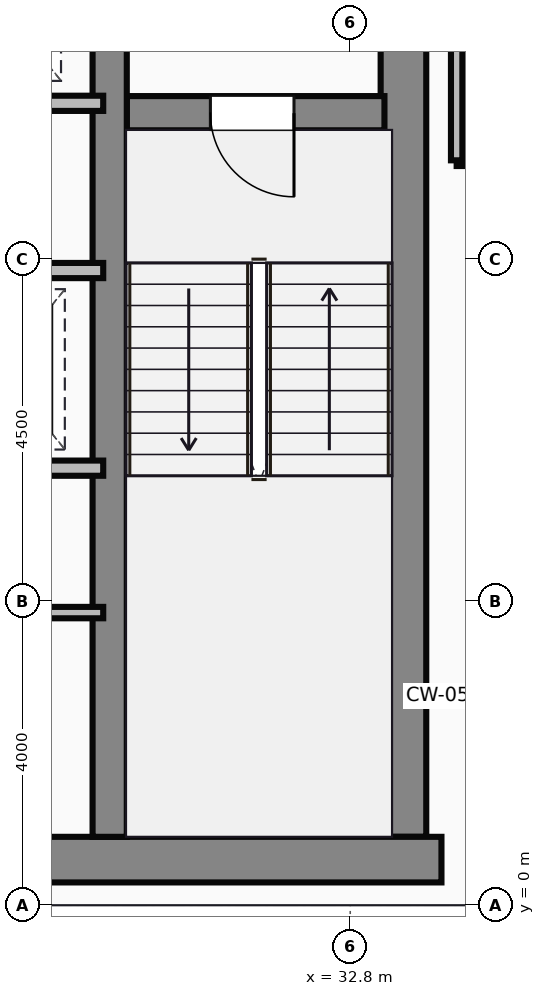
"""IFC4 building model, lengths in metres.
Left out: names, types, materials, properties, quantities, classifications, styles, units other than length and angle.
Written with IfcOpenShell. Run it as: python <this file> out.ifc"""

import sys

from ifc_helpers import new_model, si_unit, direction, frame, frame_2d, origin, place, context, subcontext, project, spatial, rectangle, extrude, source, transform, mapped, element, fill, save


model = new_model("IFC4")
c1 = context("Model", 3, precision=1e-05, world=origin(), true_north=direction((0.0, 1.0)))
c2 = subcontext(c1, "Body", "Model", "MODEL_VIEW")
j1 = project(units=[si_unit("LENGTHUNIT", "METRE"), si_unit("PLANEANGLEUNIT", "RADIAN")], contexts=[c1])
p1 = place(None, origin())
s1 = spatial("IfcSite", under=j1, at=p1, CompositionType="ELEMENT")
p2 = place(p1, origin())
s2 = spatial("IfcBuilding", under=s1, at=p2, CompositionType="ELEMENT")
p3 = place(p2, frame((0.0, 0.0, 188.6)))
s3 = spatial("IfcBuildingStorey", under=s2, at=p3, CompositionType="ELEMENT", Elevation=188.6)
m1 = source(origin(), c2, "Body", "SweptSolid", [
    extrude(rectangle(XDim=29.5, YDim=0.6, at=frame_2d((14.75, 0.0))), origin(), (0.0, 0.0, 1.0), 3.65),
])
p4 = place(p3, frame((4.5, 0.6, 0.0), z_axis=(0.0, 0.0, 1.0), x_axis=(1.0, 0.0, 0.0)))
e1 = element("IfcWall", 1, at=p4, inside=s3, PredefinedType="SHEAR", context=c2, shape_type="MappedRepresentation", body=[
    mapped(m1, transform((0.0, 0.0, 0.0))),
])
m2 = source(origin(), c2, "Body", "SweptSolid", [
    extrude(rectangle(XDim=13.1, YDim=0.6, at=frame_2d((6.55, 0.0))), origin(), (0.0, 0.0, 1.0), 3.65),
])
p5 = place(p3, frame((33.5, 0.9, 0.0), z_axis=(0.0, 0.0, 1.0), x_axis=(0.0, 1.0, 0.0)))
e2 = element("IfcWall", 2, at=p5, inside=s3, PredefinedType="SHEAR", context=c2, shape_type="MappedRepresentation", body=[
    mapped(m2, transform((0.0, 0.0, 0.0))),
])
m3 = source(origin(), c2, "Body", "SweptSolid", [
    extrude(rectangle(XDim=12.5, YDim=0.45, at=frame_2d((6.25, 0.0))), origin(), (0.0, 0.0, 1.0), 3.65),
])
p6 = place(p3, frame((29.635, 0.9, 0.0), z_axis=(0.0, 0.0, 1.0), x_axis=(0.0, 1.0, 0.0)))
e3 = element("IfcWall", 3, at=p6, inside=s3, PredefinedType="SHEAR", context=c2, shape_type="MappedRepresentation", body=[
    mapped(m3, transform((0.0, 0.0, 0.0))),
])
m4 = source(origin(), c2, "Body", "SweptSolid", [
    extrude(rectangle(XDim=3.39, YDim=0.45, at=frame_2d((1.695, 0.0))), origin(), (0.0, 0.0, 1.0), 3.65),
])
p7 = place(p3, frame((29.86, 10.42, 0.0), z_axis=(0.0, 0.0, 1.0), x_axis=(1.0, 0.0, 0.0)))
e4 = element("IfcWall", 4, at=p7, inside=s3, PredefinedType="SHEAR", context=c2, shape_type="MappedRepresentation", body=[
    mapped(m4, transform((0.0, 0.0, 0.0))),
])
p8 = place(p7, frame((1.1, 0.0, 0.0)))
e5 = element("IfcOpeningElement", 5, at=p8, cuts=e4, PredefinedType="OPENING", context=c2, shape_type="SweptSolid", body=[
    extrude(rectangle(XDim=1.1, YDim=2.15, at=frame_2d((0.55, 1.075))), frame((0.0, 0.235, 0.0), z_axis=(0.0, -1.0, 0.0), x_axis=(1.0, 0.0, 0.0)), (0.0, 0.0, 1.0), 0.47),
])
m5 = source(origin(), c2, "Body", "SweptSolid", [
    extrude(rectangle(XDim=8.8, YDim=0.2, at=frame_2d((4.4, 0.0))), origin(), (0.0, 0.0, 1.0), 3.4),
])
p9 = place(p3, frame((20.75, 10.55, 0.0), z_axis=(0.0, 0.0, 1.0), x_axis=(1.0, 0.0, 0.0)))
e6 = element("IfcWall", 6, at=p9, inside=s3, PredefinedType="PARTITIONING", context=c2, shape_type="MappedRepresentation", body=[
    mapped(m5, transform((0.0, 0.0, 0.0))),
])
p10 = place(p9, frame((0.5, 0.0, 0.0)))
e7 = element("IfcOpeningElement", 7, at=p10, cuts=e6, PredefinedType="OPENING", context=c2, shape_type="SweptSolid", body=[
    extrude(rectangle(XDim=1.05, YDim=2.15, at=frame_2d((0.525, 1.075))), frame((0.0, 0.11, 0.0), z_axis=(0.0, -1.0, 0.0), x_axis=(1.0, 0.0, 0.0)), (0.0, 0.0, 1.0), 0.22),
])
p11 = place(p9, frame((2.6, 0.0, 0.0)))
e8 = element("IfcOpeningElement", 8, at=p11, cuts=e6, PredefinedType="OPENING", context=c2, shape_type="SweptSolid", body=[
    extrude(rectangle(XDim=1.05, YDim=2.15, at=frame_2d((0.525, 1.075))), frame((0.0, 0.11, 0.0), z_axis=(0.0, -1.0, 0.0), x_axis=(1.0, 0.0, 0.0)), (0.0, 0.0, 1.0), 0.22),
])
p12 = place(p9, frame((4.7, 0.0, 0.0)))
e9 = element("IfcOpeningElement", 9, at=p12, cuts=e6, PredefinedType="OPENING", context=c2, shape_type="SweptSolid", body=[
    extrude(rectangle(XDim=1.05, YDim=2.15, at=frame_2d((0.525, 1.075))), frame((0.0, 0.11, 0.0), z_axis=(0.0, -1.0, 0.0), x_axis=(1.0, 0.0, 0.0)), (0.0, 0.0, 1.0), 0.22),
])
p13 = place(p9, frame((6.8, 0.0, 0.0)))
e10 = element("IfcOpeningElement", 10, at=p13, cuts=e6, PredefinedType="OPENING", context=c2, shape_type="SweptSolid", body=[
    extrude(rectangle(XDim=1.05, YDim=2.15, at=frame_2d((0.525, 1.075))), frame((0.0, 0.11, 0.0), z_axis=(0.0, -1.0, 0.0), x_axis=(1.0, 0.0, 0.0)), (0.0, 0.0, 1.0), 0.22),
])
m6 = source(origin(), c2, "Body", "SweptSolid", [
    extrude(rectangle(XDim=4.55, YDim=0.2, at=frame_2d((2.275, 0.0))), origin(), (0.0, 0.0, 1.0), 3.4),
])
p14 = place(p3, frame((25.0, 8.35, 0.0), z_axis=(0.0, 0.0, 1.0), x_axis=(1.0, 0.0, 0.0)))
e11 = element("IfcWall", 11, at=p14, inside=s3, PredefinedType="PARTITIONING", context=c2, shape_type="MappedRepresentation", body=[
    mapped(m6, transform((0.0, 0.0, 0.0))),
])
p15 = place(p14, frame((0.5, 0.0, 0.0)))
e12 = element("IfcOpeningElement", 12, at=p15, cuts=e11, PredefinedType="OPENING", context=c2, shape_type="SweptSolid", body=[
    extrude(rectangle(XDim=1.05, YDim=2.15, at=frame_2d((0.525, 1.075))), frame((0.0, 0.11, 0.0), z_axis=(0.0, -1.0, 0.0), x_axis=(1.0, 0.0, 0.0)), (0.0, 0.0, 1.0), 0.22),
])
p16 = place(p14, frame((2.6, 0.0, 0.0)))
e13 = element("IfcOpeningElement", 13, at=p16, cuts=e11, PredefinedType="OPENING", context=c2, shape_type="SweptSolid", body=[
    extrude(rectangle(XDim=1.05, YDim=2.15, at=frame_2d((0.525, 1.075))), frame((0.0, 0.11, 0.0), z_axis=(0.0, -1.0, 0.0), x_axis=(1.0, 0.0, 0.0)), (0.0, 0.0, 1.0), 0.22),
])
p17 = place(p3, frame((25.0, 5.75, 0.0), z_axis=(0.0, 0.0, 1.0), x_axis=(1.0, 0.0, 0.0)))
e14 = element("IfcWall", 14, at=p17, inside=s3, PredefinedType="PARTITIONING", context=c2, shape_type="MappedRepresentation", body=[
    mapped(m6, transform((0.0, 0.0, 0.0))),
])
m7 = source(origin(), c2, "Body", "SweptSolid", [
    extrude(rectangle(XDim=4.55, YDim=0.15, at=frame_2d((2.275, 0.0))), origin(), (0.0, 0.0, 1.0), 3.4),
])
p18 = place(p3, frame((25.0, 3.85, 0.0), z_axis=(0.0, 0.0, 1.0), x_axis=(1.0, 0.0, 0.0)))
e15 = element("IfcWall", 15, at=p18, inside=s3, PredefinedType="PARTITIONING", context=c2, shape_type="MappedRepresentation", body=[
    mapped(m7, transform((0.0, 0.0, 0.0))),
])
m8 = source(origin(), c2, "Body", "SweptSolid", [
    extrude(rectangle(XDim=4.8, YDim=0.15, at=frame_2d((2.4, 0.0))), origin(), (0.0, 0.0, 1.0), 3.4),
])
p19 = place(p3, frame((34.2, 9.8, 0.0), z_axis=(0.0, 0.0, 1.0), x_axis=(1.0, 0.0, 0.0)))
e16 = element("IfcWall", 16, at=p19, inside=s3, PredefinedType="PARTITIONING", context=c2, shape_type="MappedRepresentation", body=[
    mapped(m8, transform((0.0, 0.0, 0.0))),
])
m9 = source(origin(), c2, "Body", "SweptSolid", [
    extrude(rectangle(XDim=4.18, YDim=0.15, at=frame_2d((2.09, 0.0))), origin(), (0.0, 0.0, 1.0), 3.4),
])
p20 = place(p3, frame((34.2, 9.8, 0.0), z_axis=(0.0, 0.0, 1.0), x_axis=(0.0, 1.0, 0.0)))
e17 = element("IfcWall", 17, at=p20, inside=s3, PredefinedType="PARTITIONING", context=c2, shape_type="MappedRepresentation", body=[
    mapped(m9, transform((0.0, 0.0, 0.0))),
])
m10 = source(origin(), c2, "Body", "SweptSolid", [
    extrude(rectangle(XDim=1.1, YDim=2.15, at=frame_2d((0.55, 1.075))), frame((0.0, 0.025, 0.0), z_axis=(0.0, -1.0, 0.0), x_axis=(1.0, 0.0, 0.0)), (0.0, 0.0, 1.0), 0.05),
])
p21 = place(p8, frame((1.1, 0.0, 0.0), z_axis=(0.0, 0.0, 1.0), x_axis=(-1.0, 0.0, 0.0)))
e18 = element("IfcDoor", 18, at=p21, inside=s3, OperationType="SINGLE_SWING_RIGHT", PredefinedType="DOOR", context=c2, shape_type="MappedRepresentation", body=[
    mapped(m10, transform((0.0, 0.0, 0.0))),
])
fill(e5, e18)
save(model, sys.argv[1])
